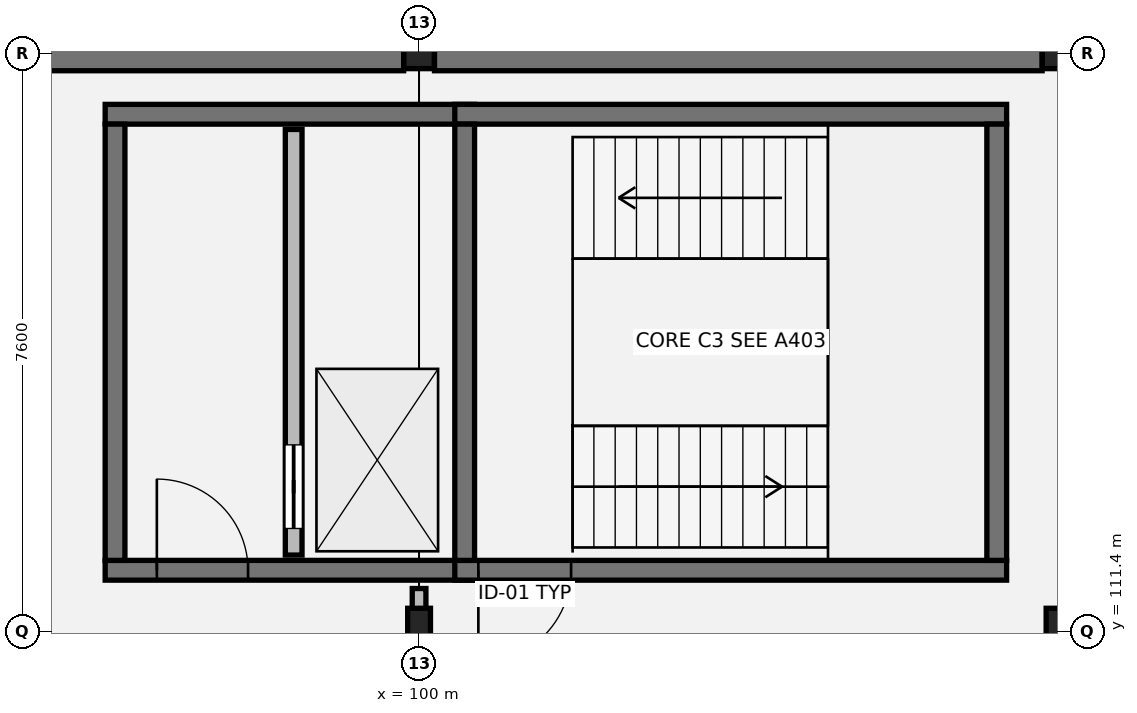
"""IFC4 building model, lengths in metres.
Left out: names, types, materials, properties, quantities, classifications, styles, units other than length and angle.
Written with IfcOpenShell. Run it as: python <this file> out.ifc"""

import sys

from ifc_helpers import new_model, si_unit, direction, frame, frame_2d, origin, origin_2d, place, context, subcontext, project, spatial, rectangle, hollow_rectangle, i_section, extrude, element, fill, save


model = new_model("IFC4")
c1 = context("Model", 3, precision=1e-05, world=origin(), true_north=direction((0.0, 1.0)))
c2 = subcontext(c1, "Body", "Model", "MODEL_VIEW")
j1 = project(units=[si_unit("LENGTHUNIT", "METRE"), si_unit("PLANEANGLEUNIT", "RADIAN")], contexts=[c1])
p1 = place(None, origin())
s1 = spatial("IfcSite", under=j1, at=p1, CompositionType="ELEMENT")
p2 = place(p1, origin())
s2 = spatial("IfcBuilding", under=s1, at=p2, CompositionType="ELEMENT")
p3 = place(p2, frame((0.0, 0.0, -4.42)))
s3 = spatial("IfcBuildingStorey", under=s2, at=p3, CompositionType="ELEMENT", Elevation=-4.42)
p4 = place(p3, frame((100.0, 111.4, 0.0), z_axis=(0.0, 0.0, 1.0), x_axis=(1.0, 0.0, 0.0)))
e1 = element("IfcColumn", 1, at=p4, inside=s3, PredefinedType="COLUMN", context=c2, shape_type="SweptSolid", body=[
    extrude(i_section(OverallWidth=0.3, OverallDepth=0.6, WebThickness=0.015, FlangeThickness=0.03, at=origin_2d()), origin(), (0.0, 0.0, 1.0), 4.395),
])
p5 = place(p3, frame((100.0, 119.0, 0.0), z_axis=(0.0, 0.0, 1.0), x_axis=(1.0, 0.0, 0.0)))
e2 = element("IfcColumn", 2, at=p5, inside=s3, PredefinedType="COLUMN", context=c2, shape_type="SweptSolid", body=[
    extrude(hollow_rectangle(XDim=0.4, YDim=0.4, WallThickness=0.016, at=origin_2d()), origin(), (0.0, 0.0, 1.0), 4.395),
])
p6 = place(p3, frame((108.4, 111.4, 0.0), z_axis=(0.0, 0.0, 1.0), x_axis=(1.0, 0.0, 0.0)))
e3 = element("IfcColumn", 3, at=p6, inside=s3, PredefinedType="COLUMN", context=c2, shape_type="SweptSolid", body=[
    extrude(i_section(OverallWidth=0.3, OverallDepth=0.6, WebThickness=0.015, FlangeThickness=0.03, at=origin_2d()), origin(), (0.0, 0.0, 1.0), 4.395),
])
p7 = place(p3, frame((108.4, 119.0, 0.0), z_axis=(0.0, 0.0, 1.0), x_axis=(1.0, 0.0, 0.0)))
e4 = element("IfcColumn", 4, at=p7, inside=s3, PredefinedType="COLUMN", context=c2, shape_type="SweptSolid", body=[
    extrude(hollow_rectangle(XDim=0.4, YDim=0.4, WallThickness=0.016, at=origin_2d()), origin(), (0.0, 0.0, 1.0), 4.395),
])
for number, where, z_axis, x_axis in (
    (5, (91.803, 119.0, 0.0), (0.0, 0.0, 1.0), (1.0, 0.0, 0.0)),
    (6, (100.203, 119.0, 0.0), (0.0, 0.0, 1.0), (1.0, 0.0, 0.0)),
):
    element("IfcWall", number, at=place(p3, frame(where, z_axis=z_axis, x_axis=x_axis)), inside=s3, PredefinedType="USERDEFINED", context=c2, shape_type="SweptSolid", body=[
        extrude(rectangle(XDim=7.994, YDim=0.455, at=frame_2d((3.997, 0.0))), origin(), (0.0, 0.0, 1.0), 3.82),
    ])
p8 = place(p3, frame((95.87, 112.2, 0.0), z_axis=(0.0, 0.0, 1.0), x_axis=(1.0, 0.0, 0.0)))
e7 = element("IfcWall", 7, at=p8, inside=s3, PredefinedType="SHEAR", context=c2, shape_type="SweptSolid", body=[
    extrude(rectangle(XDim=4.86, YDim=0.26, at=frame_2d((2.43, 0.0))), origin(), (0.0, 0.0, 1.0), 4.185),
])
p9 = place(p8, frame((0.68, 0.0, 0.0)))
e8 = element("IfcOpeningElement", 8, at=p9, cuts=e7, PredefinedType="OPENING", context=c2, shape_type="SweptSolid", body=[
    extrude(rectangle(XDim=1.2, YDim=2.16, at=frame_2d((0.6, 1.08))), frame((0.0, 0.14, 0.0), z_axis=(0.0, -1.0, 0.0), x_axis=(1.0, 0.0, 0.0)), (0.0, 0.0, 1.0), 0.28),
])
p10 = place(p3, frame((100.73, 118.2, 0.0), z_axis=(0.0, 0.0, 1.0), x_axis=(-1.0, 0.0, 0.0)))
e9 = element("IfcWall", 9, at=p10, inside=s3, PredefinedType="SHEAR", context=c2, shape_type="SweptSolid", body=[
    extrude(rectangle(XDim=4.86, YDim=0.26, at=frame_2d((2.43, 0.0))), origin(), (0.0, 0.0, 1.0), 4.185),
])
p11 = place(p3, frame((96.0, 118.07, 0.0), z_axis=(0.0, 0.0, 1.0), x_axis=(0.0, -1.0, 0.0)))
e10 = element("IfcWall", 10, at=p11, inside=s3, PredefinedType="SHEAR", context=c2, shape_type="SweptSolid", body=[
    extrude(rectangle(XDim=5.74, YDim=0.26, at=frame_2d((2.87, 0.0))), origin(), (0.0, 0.0, 1.0), 4.185),
])
p12 = place(p3, frame((98.35, 112.4, 0.0), z_axis=(0.0, 0.0, 1.0), x_axis=(0.0, 1.0, 0.0)))
e11 = element("IfcWall", 11, at=p12, inside=s3, PredefinedType="SOLIDWALL", context=c2, shape_type="SweptSolid", body=[
    extrude(rectangle(XDim=5.6, YDim=0.22, at=frame_2d((2.8, 0.0))), origin(), (0.0, 0.0, 1.0), 4.185),
])
p13 = place(p12, frame((0.35, 0.0, 0.0)))
e12 = element("IfcOpeningElement", 12, at=p13, cuts=e11, PredefinedType="OPENING", context=c2, shape_type="SweptSolid", body=[
    extrude(rectangle(XDim=1.1, YDim=2.15, at=frame_2d((0.55, 1.075))), frame((0.0, 0.12, 0.0), z_axis=(0.0, -1.0, 0.0), x_axis=(1.0, 0.0, 0.0)), (0.0, 0.0, 1.0), 0.24),
])
p14 = place(p3, frame((100.47, 112.2, 0.0), z_axis=(0.0, 0.0, 1.0), x_axis=(1.0, 0.0, 0.0)))
e13 = element("IfcWall", 13, at=p14, inside=s3, PredefinedType="SHEAR", context=c2, shape_type="SweptSolid", body=[
    extrude(rectangle(XDim=7.26, YDim=0.26, at=frame_2d((3.63, 0.0))), origin(), (0.0, 0.0, 1.0), 4.185),
])
p15 = place(p14, frame((0.31, 0.0, 0.0)))
e14 = element("IfcOpeningElement", 14, at=p15, cuts=e13, PredefinedType="OPENING", context=c2, shape_type="SweptSolid", body=[
    extrude(rectangle(XDim=1.22, YDim=2.18, at=frame_2d((0.61, 1.09))), frame((0.0, 0.14, 0.0), z_axis=(0.0, -1.0, 0.0), x_axis=(1.0, 0.0, 0.0)), (0.0, 0.0, 1.0), 0.28),
])
p16 = place(p3, frame((100.47, 118.2, 0.0), z_axis=(0.0, 0.0, 1.0), x_axis=(1.0, 0.0, 0.0)))
e15 = element("IfcWall", 15, at=p16, inside=s3, PredefinedType="SHEAR", context=c2, shape_type="SweptSolid", body=[
    extrude(rectangle(XDim=7.26, YDim=0.26, at=frame_2d((3.63, 0.0))), origin(), (0.0, 0.0, 1.0), 4.185),
])
for number, where, z_axis, x_axis in (
    (16, (100.6, 112.33, 0.0), (0.0, 0.0, 1.0), (0.0, 1.0, 0.0)),
    (17, (107.6, 112.33, 0.0), (0.0, 0.0, 1.0), (0.0, 1.0, 0.0)),
):
    element("IfcWall", number, at=place(p3, frame(where, z_axis=z_axis, x_axis=x_axis)), inside=s3, PredefinedType="SHEAR", context=c2, shape_type="SweptSolid", body=[
        extrude(rectangle(XDim=5.74, YDim=0.26, at=frame_2d((2.87, 0.0))), origin(), (0.0, 0.0, 1.0), 4.185),
    ])
p17 = place(p3, frame((100.0, 111.64, 0.0), z_axis=(0.0, 0.0, 1.0), x_axis=(0.0, 1.0, 0.0)))
e18 = element("IfcWall", 18, at=p17, inside=s3, PredefinedType="PARTITIONING", context=c2, shape_type="SweptSolid", body=[
    extrude(rectangle(XDim=0.32, YDim=0.18, at=frame_2d((0.16, 0.0))), origin(), (0.0, 0.0, 1.0), 3.52),
])
p18 = place(p9, origin())
e19 = element("IfcDoor", 19, at=p18, inside=s3, OperationType="SINGLE_SWING_LEFT", PredefinedType="DOOR", context=c2, shape_type="SweptSolid", body=[
    extrude(rectangle(XDim=1.2, YDim=2.16, at=frame_2d((0.6, 1.08))), frame((0.0, 0.025, 0.0), z_axis=(0.0, -1.0, 0.0), x_axis=(1.0, 0.0, 0.0)), (0.0, 0.0, 1.0), 0.05),
])
fill(e8, e19)
p19 = place(p13, origin())
e20 = element("IfcDoor", 20, at=p19, inside=s3, OperationType="SLIDING_TO_LEFT", PredefinedType="DOOR", context=c2, shape_type="SweptSolid", body=[
    extrude(rectangle(XDim=1.1, YDim=2.15, at=frame_2d((0.55, 1.075))), frame((0.0, 0.025, 0.0), z_axis=(0.0, -1.0, 0.0), x_axis=(1.0, 0.0, 0.0)), (0.0, 0.0, 1.0), 0.05),
])
fill(e12, e20)
p20 = place(p15, origin())
e21 = element("IfcDoor", 21, at=p20, inside=s3, OperationType="SINGLE_SWING_RIGHT", PredefinedType="DOOR", context=c2, shape_type="SweptSolid", body=[
    extrude(rectangle(XDim=1.22, YDim=2.18, at=frame_2d((0.61, 1.09))), frame((0.0, 0.025, 0.0), z_axis=(0.0, -1.0, 0.0), x_axis=(1.0, 0.0, 0.0)), (0.0, 0.0, 1.0), 0.05),
])
fill(e14, e21)
save(model, sys.argv[1])
